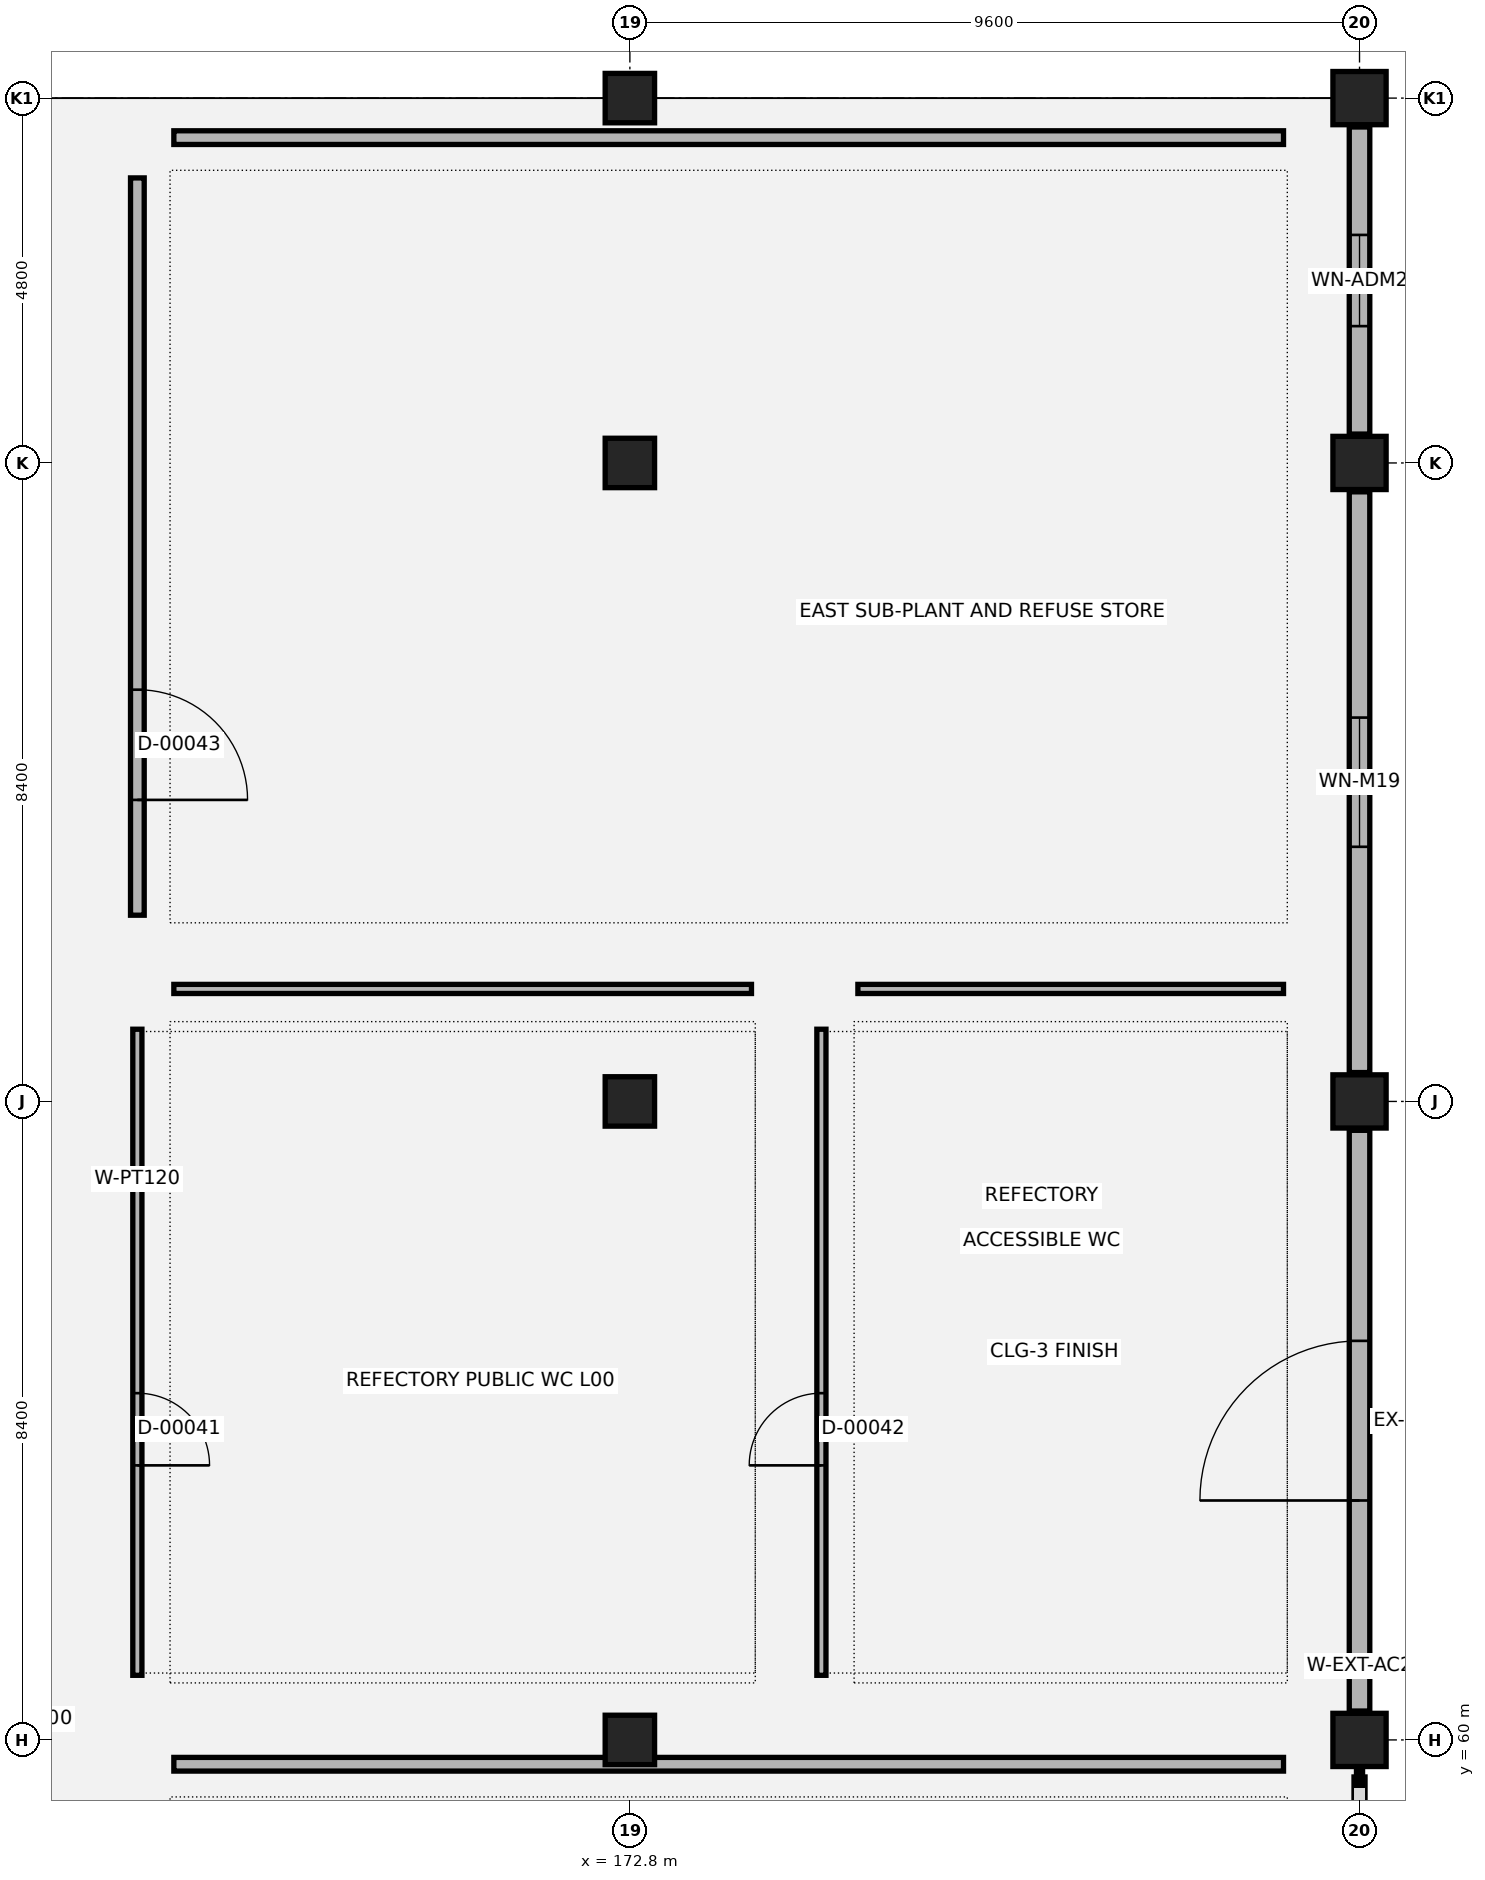
"""IFC4 building model, lengths in metres.
Left out: names, types, materials, properties, quantities, classifications, styles, units other than length and angle.
Written with IfcOpenShell. Run it as: python <this file> out.ifc"""

import sys

from ifc_helpers import new_model, si_unit, direction, frame, frame_2d, origin, origin_2d, place, context, subcontext, project, spatial, rectangle, extrude, element, fill, save


model = new_model("IFC4")
c1 = context("Model", 3, precision=1e-05, world=origin(), true_north=direction((0.0, 1.0)))
c2 = subcontext(c1, "Body", "Model", "MODEL_VIEW")
j1 = project(units=[si_unit("LENGTHUNIT", "METRE"), si_unit("PLANEANGLEUNIT", "RADIAN")], contexts=[c1])
p1 = place(None, origin())
s1 = spatial("IfcSite", under=j1, at=p1, CompositionType="ELEMENT")
p2 = place(p1, origin())
s2 = spatial("IfcBuilding", under=s1, at=p2, CompositionType="ELEMENT")
p3 = place(p2, origin())
s3 = spatial("IfcBuildingStorey", under=s2, at=p3, CompositionType="ELEMENT", Elevation=0.0)
for number, where, z_axis, x_axis in (
    (1, (172.8, 60.0, 0.0), (0.0, 0.0, 1.0), (1.0, 0.0, 0.0)),
    (2, (172.8, 68.4, 0.0), (0.0, 0.0, 1.0), (1.0, 0.0, 0.0)),
    (3, (172.8, 76.8, 0.0), (0.0, 0.0, 1.0), (1.0, 0.0, 0.0)),
    (4, (172.8, 81.6, 0.0), (0.0, 0.0, 1.0), (1.0, 0.0, 0.0)),
):
    element("IfcColumn", number, at=place(p3, frame(where, z_axis=z_axis, x_axis=x_axis)), inside=s3, PredefinedType="COLUMN", context=c2, shape_type="SweptSolid", body=[
        extrude(rectangle(XDim=0.65, YDim=0.65, at=origin_2d()), origin(), (0.0, 0.0, 1.0), 5.4),
    ])
for number, where, z_axis, x_axis in (
    (5, (182.4, 60.0, 0.0), (0.0, 0.0, 1.0), (1.0, 0.0, 0.0)),
    (6, (182.4, 68.4, 0.0), (0.0, 0.0, 1.0), (1.0, 0.0, 0.0)),
    (7, (182.4, 76.8, 0.0), (0.0, 0.0, 1.0), (1.0, 0.0, 0.0)),
    (8, (182.4, 81.6, 0.0), (0.0, 0.0, 1.0), (1.0, 0.0, 0.0)),
):
    element("IfcColumn", number, at=place(p3, frame(where, z_axis=z_axis, x_axis=x_axis)), inside=s3, PredefinedType="COLUMN", context=c2, shape_type="SweptSolid", body=[
        extrude(rectangle(XDim=0.7, YDim=0.7, at=origin_2d()), origin(), (0.0, 0.0, 1.0), 5.4),
    ])
p4 = place(p3, frame((182.4, 60.38, 0.0), z_axis=(0.0, 0.0, 1.0), x_axis=(0.0, 1.0, 0.0)))
e9 = element("IfcWall", 9, at=p4, inside=s3, PredefinedType="SOLIDWALL", context=c2, shape_type="SweptSolid", body=[
    extrude(rectangle(XDim=7.64, YDim=0.27, at=frame_2d((3.82, 0.0))), origin(), (0.0, 0.0, 1.0), 4.04),
])
p5 = place(p4, frame((2.77, 0.0, 0.0)))
e10 = element("IfcOpeningElement", 10, at=p5, cuts=e9, PredefinedType="OPENING", context=c2, shape_type="SweptSolid", body=[
    extrude(rectangle(XDim=2.1, YDim=2.2, at=frame_2d((1.05, 1.1))), frame((0.0, 0.145, 0.0), z_axis=(0.0, -1.0, 0.0), x_axis=(1.0, 0.0, 0.0)), (0.0, 0.0, 1.0), 0.29),
])
p6 = place(p3, frame((182.4, 68.78, 0.0), z_axis=(0.0, 0.0, 1.0), x_axis=(0.0, 1.0, 0.0)))
e11 = element("IfcWall", 11, at=p6, inside=s3, PredefinedType="SOLIDWALL", context=c2, shape_type="SweptSolid", body=[
    extrude(rectangle(XDim=7.64, YDim=0.27, at=frame_2d((3.82, 0.0))), origin(), (0.0, 0.0, 1.0), 4.04),
])
p7 = place(p6, frame((2.97, 0.0, 0.9)))
e12 = element("IfcOpeningElement", 12, at=p7, cuts=e11, PredefinedType="OPENING", context=c2, shape_type="SweptSolid", body=[
    extrude(rectangle(XDim=1.7, YDim=1.45, at=frame_2d((0.85, 0.725))), frame((0.0, 0.145, 0.0), z_axis=(0.0, -1.0, 0.0), x_axis=(1.0, 0.0, 0.0)), (0.0, 0.0, 1.0), 0.29),
])
p8 = place(p3, frame((182.4, 77.18, 0.0), z_axis=(0.0, 0.0, 1.0), x_axis=(0.0, 1.0, 0.0)))
e13 = element("IfcWall", 13, at=p8, inside=s3, PredefinedType="SOLIDWALL", context=c2, shape_type="SweptSolid", body=[
    extrude(rectangle(XDim=4.04, YDim=0.27, at=frame_2d((2.02, 0.0))), origin(), (0.0, 0.0, 1.0), 4.04),
])
p9 = place(p8, frame((1.42, 0.0, 0.9)))
e14 = element("IfcOpeningElement", 14, at=p9, cuts=e13, PredefinedType="OPENING", context=c2, shape_type="SweptSolid", body=[
    extrude(rectangle(XDim=1.2, YDim=1.4, at=frame_2d((0.6, 0.7))), frame((0.0, 0.145, 0.0), z_axis=(0.0, -1.0, 0.0), x_axis=(1.0, 0.0, 0.0)), (0.0, 0.0, 1.0), 0.29),
])
p10 = place(p3, frame((166.8, 59.68, 0.0), z_axis=(0.0, 0.0, 1.0), x_axis=(1.0, 0.0, 0.0)))
e15 = element("IfcWall", 15, at=p10, inside=s3, PredefinedType="PARTITIONING", context=c2, shape_type="SweptSolid", body=[
    extrude(rectangle(XDim=14.6, YDim=0.18, at=frame_2d((7.3, 0.0))), origin(), (0.0, 0.0, 1.0), 4.04),
])
p11 = place(p3, frame((166.32, 60.85, 0.0), z_axis=(0.0, 0.0, 1.0), x_axis=(0.0, 1.0, 0.0)))
e16 = element("IfcWall", 16, at=p11, inside=s3, PredefinedType="PARTITIONING", context=c2, shape_type="SweptSolid", body=[
    extrude(rectangle(XDim=8.5, YDim=0.12, at=frame_2d((4.25, 0.0))), origin(), (0.0, 0.0, 1.0), 4.04),
])
p12 = place(p11, frame((2.762, 0.0, 0.0)))
e17 = element("IfcOpeningElement", 17, at=p12, cuts=e16, PredefinedType="OPENING", context=c2, shape_type="SweptSolid", body=[
    extrude(rectangle(XDim=0.95, YDim=2.1, at=frame_2d((0.475, 1.05))), frame((0.0, 0.07, 0.0), z_axis=(0.0, -1.0, 0.0), x_axis=(1.0, 0.0, 0.0)), (0.0, 0.0, 1.0), 0.14),
])
p13 = place(p3, frame((166.8, 69.88, 0.0), z_axis=(0.0, 0.0, 1.0), x_axis=(1.0, 0.0, 0.0)))
e18 = element("IfcWall", 18, at=p13, inside=s3, PredefinedType="PARTITIONING", context=c2, shape_type="SweptSolid", body=[
    extrude(rectangle(XDim=7.6, YDim=0.12, at=frame_2d((3.8, 0.0))), origin(), (0.0, 0.0, 1.0), 4.04),
])
p14 = place(p3, frame((175.32, 60.85, 0.0), z_axis=(0.0, 0.0, 1.0), x_axis=(0.0, 1.0, 0.0)))
e19 = element("IfcWall", 19, at=p14, inside=s3, PredefinedType="PARTITIONING", context=c2, shape_type="SweptSolid", body=[
    extrude(rectangle(XDim=8.5, YDim=0.12, at=frame_2d((4.25, 0.0))), origin(), (0.0, 0.0, 1.0), 4.04),
])
p15 = place(p14, frame((2.762, 0.0, 0.0)))
e20 = element("IfcOpeningElement", 20, at=p15, cuts=e19, PredefinedType="OPENING", context=c2, shape_type="SweptSolid", body=[
    extrude(rectangle(XDim=0.95, YDim=2.1, at=frame_2d((0.475, 1.05))), frame((0.0, 0.07, 0.0), z_axis=(0.0, -1.0, 0.0), x_axis=(1.0, 0.0, 0.0)), (0.0, 0.0, 1.0), 0.14),
])
p16 = place(p3, frame((175.8, 69.88, 0.0), z_axis=(0.0, 0.0, 1.0), x_axis=(1.0, 0.0, 0.0)))
e21 = element("IfcWall", 21, at=p16, inside=s3, PredefinedType="PARTITIONING", context=c2, shape_type="SweptSolid", body=[
    extrude(rectangle(XDim=5.6, YDim=0.12, at=frame_2d((2.8, 0.0))), origin(), (0.0, 0.0, 1.0), 4.04),
])
p17 = place(p3, frame((166.32, 70.85, 0.0), z_axis=(0.0, 0.0, 1.0), x_axis=(0.0, 1.0, 0.0)))
e22 = element("IfcWall", 22, at=p17, inside=s3, PredefinedType="PARTITIONING", context=c2, shape_type="SweptSolid", body=[
    extrude(rectangle(XDim=9.7, YDim=0.18, at=frame_2d((4.85, 0.0))), origin(), (0.0, 0.0, 1.0), 4.04),
])
p18 = place(p17, frame((1.517, 0.0, 0.0)))
e23 = element("IfcOpeningElement", 23, at=p18, cuts=e22, PredefinedType="OPENING", context=c2, shape_type="SweptSolid", body=[
    extrude(rectangle(XDim=1.45, YDim=2.15, at=frame_2d((0.725, 1.075))), frame((0.0, 0.1, 0.0), z_axis=(0.0, -1.0, 0.0), x_axis=(1.0, 0.0, 0.0)), (0.0, 0.0, 1.0), 0.2),
])
p19 = place(p3, frame((166.8, 81.08, 0.0), z_axis=(0.0, 0.0, 1.0), x_axis=(1.0, 0.0, 0.0)))
e24 = element("IfcWall", 24, at=p19, inside=s3, PredefinedType="PARTITIONING", context=c2, shape_type="SweptSolid", body=[
    extrude(rectangle(XDim=14.6, YDim=0.18, at=frame_2d((7.3, 0.0))), origin(), (0.0, 0.0, 1.0), 4.04),
])
p20 = place(p5, origin())
e25 = element("IfcDoor", 25, at=p20, inside=s3, OperationType="SINGLE_SWING_LEFT", PredefinedType="DOOR", context=c2, shape_type="SweptSolid", body=[
    extrude(rectangle(XDim=2.1, YDim=2.2, at=frame_2d((1.05, 1.1))), frame((0.0, 0.025, 0.0), z_axis=(0.0, -1.0, 0.0), x_axis=(1.0, 0.0, 0.0)), (0.0, 0.0, 1.0), 0.05),
])
fill(e10, e25)
p21 = place(p7, origin())
e26 = element("IfcWindow", 26, at=p21, inside=s3, PartitioningType="SINGLE_PANEL", PredefinedType="WINDOW", context=c2, shape_type="SweptSolid", body=[
    extrude(rectangle(XDim=1.7, YDim=1.45, at=frame_2d((0.85, 0.725))), frame((0.0, 0.03, 0.0), z_axis=(0.0, -1.0, 0.0), x_axis=(1.0, 0.0, 0.0)), (0.0, 0.0, 1.0), 0.06),
])
fill(e12, e26)
p22 = place(p9, origin())
e27 = element("IfcWindow", 27, at=p22, inside=s3, PartitioningType="SINGLE_PANEL", PredefinedType="WINDOW", context=c2, shape_type="SweptSolid", body=[
    extrude(rectangle(XDim=1.2, YDim=1.4, at=frame_2d((0.6, 0.7))), frame((0.0, 0.03, 0.0), z_axis=(0.0, -1.0, 0.0), x_axis=(1.0, 0.0, 0.0)), (0.0, 0.0, 1.0), 0.06),
])
fill(e14, e27)
p23 = place(p12, origin())
e28 = element("IfcDoor", 28, at=p23, inside=s3, OperationType="SINGLE_SWING_RIGHT", PredefinedType="DOOR", context=c2, shape_type="SweptSolid", body=[
    extrude(rectangle(XDim=0.95, YDim=2.1, at=frame_2d((0.475, 1.05))), frame((0.0, 0.025, 0.0), z_axis=(0.0, -1.0, 0.0), x_axis=(1.0, 0.0, 0.0)), (0.0, 0.0, 1.0), 0.05),
])
fill(e17, e28)
p24 = place(p15, origin())
e29 = element("IfcDoor", 29, at=p24, inside=s3, OperationType="SINGLE_SWING_LEFT", PredefinedType="DOOR", context=c2, shape_type="SweptSolid", body=[
    extrude(rectangle(XDim=0.95, YDim=2.1, at=frame_2d((0.475, 1.05))), frame((0.0, 0.025, 0.0), z_axis=(0.0, -1.0, 0.0), x_axis=(1.0, 0.0, 0.0)), (0.0, 0.0, 1.0), 0.05),
])
fill(e20, e29)
p25 = place(p18, origin())
e30 = element("IfcDoor", 30, at=p25, inside=s3, OperationType="SINGLE_SWING_RIGHT", PredefinedType="DOOR", context=c2, shape_type="SweptSolid", body=[
    extrude(rectangle(XDim=1.45, YDim=2.15, at=frame_2d((0.725, 1.075))), frame((0.0, 0.025, 0.0), z_axis=(0.0, -1.0, 0.0), x_axis=(1.0, 0.0, 0.0)), (0.0, 0.0, 1.0), 0.05),
])
fill(e23, e30)
save(model, sys.argv[1])
